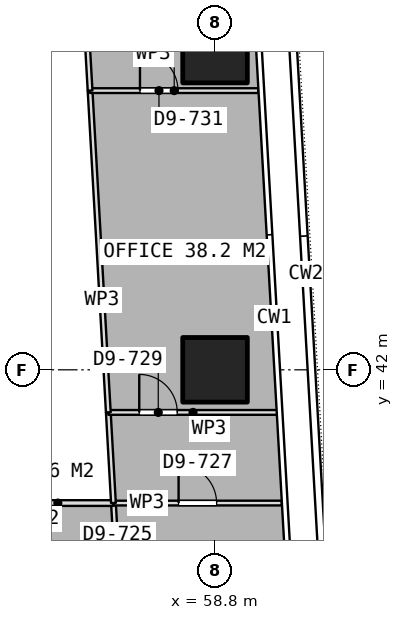
"""IFC4 building model, lengths in metres.
Left out: names, types, materials, properties, quantities, classifications, styles, units other than length and angle.
Written with IfcOpenShell. Run it as: python <this file> out.ifc"""

import sys

from ifc_helpers import new_model, si_unit, direction, frame, frame_2d, origin, origin_2d, place, context, subcontext, project, spatial, rectangle, extrude, element, fill, save


model = new_model("IFC4")
c1 = context("Model", 3, precision=1e-05, world=origin(), true_north=direction((0.0, 1.0)))
c2 = subcontext(c1, "Body", "Model", "MODEL_VIEW")
j1 = project(units=[si_unit("LENGTHUNIT", "METRE"), si_unit("PLANEANGLEUNIT", "RADIAN")], contexts=[c1])
p1 = place(None, origin())
s1 = spatial("IfcSite", under=j1, at=p1, CompositionType="ELEMENT")
p2 = place(p1, origin())
s2 = spatial("IfcBuilding", under=s1, at=p2, CompositionType="ELEMENT")
p3 = place(p2, frame((0.0, 0.0, 183.95)))
s3 = spatial("IfcBuildingStorey", under=s2, at=p3, CompositionType="ELEMENT", Elevation=183.95)
for number, where, z_axis, x_axis in (
    (1, (58.8, 42.0, 0.0), (0.0, 0.0, 1.0), (1.0, 0.0, 0.0)),
    (2, (58.8, 50.4, 0.0), (0.0, 0.0, 1.0), (1.0, 0.0, 0.0)),
):
    element("IfcColumn", number, at=place(p3, frame(where, z_axis=z_axis, x_axis=x_axis)), inside=s3, PredefinedType="COLUMN", context=c2, shape_type="SweptSolid", body=[
        extrude(rectangle(XDim=1.7, YDim=1.7, at=origin_2d()), origin(), (0.0, 0.0, 1.0), 3.75),
    ])
p4 = place(p3, frame((56.348, 34.609, 0.0), z_axis=(0.0, 0.0, 1.0), x_axis=(-0.056779989764, 0.998386715037, 0.0)))
e3 = element("IfcWall", 3, at=p4, inside=s3, PredefinedType="PARTITIONING", context=c2, shape_type="SweptSolid", body=[
    extrude(rectangle(XDim=3.891, YDim=0.125, at=frame_2d((1.946, 0.0))), origin(), (0.0, 0.0, 1.0), 3.5),
])
p5 = place(p4, frame((1.446, 0.0, 0.0)))
e4 = element("IfcOpeningElement", 4, at=p5, cuts=e3, PredefinedType="OPENING", context=c2, shape_type="SweptSolid", body=[
    extrude(rectangle(XDim=1.0, YDim=2.1, at=frame_2d((0.5, 1.05))), frame((0.0, 0.073, 0.0), z_axis=(0.0, -1.0, 0.0), x_axis=(1.0, 0.0, 0.0)), (0.0, 0.0, 1.0), 0.145),
])
p6 = place(p3, frame((56.127, 38.494, 0.0), z_axis=(0.0, 0.0, 1.0), x_axis=(1.0, 0.0, 0.0)))
e5 = element("IfcWall", 5, at=p6, inside=s3, PredefinedType="PARTITIONING", context=c2, shape_type="SweptSolid", body=[
    extrude(rectangle(XDim=4.428, YDim=0.125, at=frame_2d((2.214, 0.0))), origin(), (0.0, 0.0, 1.0), 3.5),
])
p7 = place(p6, frame((1.714, 0.0, 0.0)))
e6 = element("IfcOpeningElement", 6, at=p7, cuts=e5, PredefinedType="OPENING", context=c2, shape_type="SweptSolid", body=[
    extrude(rectangle(XDim=1.0, YDim=2.1, at=frame_2d((0.5, 1.05))), frame((0.0, 0.073, 0.0), z_axis=(0.0, -1.0, 0.0), x_axis=(1.0, 0.0, 0.0)), (0.0, 0.0, 1.0), 0.145),
])
p8 = place(p3, frame((53.2, 38.494, 0.0), z_axis=(0.0, 0.0, 1.0), x_axis=(1.0, 0.0, 0.0)))
e7 = element("IfcWall", 7, at=p8, inside=s3, PredefinedType="PARTITIONING", context=c2, shape_type="SweptSolid", body=[
    extrude(rectangle(XDim=2.927, YDim=0.15, at=frame_2d((1.463, 0.0))), origin(), (0.0, 0.0, 1.0), 3.5),
])
p9 = place(p3, frame((56.127, 38.495, 0.0), z_axis=(0.0, 0.0, 1.0), x_axis=(-0.056546005431, 0.998399994626, 0.0)))
e8 = element("IfcWall", 8, at=p9, inside=s3, PredefinedType="PARTITIONING", context=c2, shape_type="SweptSolid", body=[
    extrude(rectangle(XDim=2.388, YDim=0.125, at=frame_2d((1.194, 0.0))), origin(), (0.0, 0.0, 1.0), 3.5),
])
p10 = place(p3, frame((55.992, 40.879, 0.0), z_axis=(0.0, 0.0, 1.0), x_axis=(1.0, 0.0, 0.0)))
e9 = element("IfcWall", 9, at=p10, inside=s3, PredefinedType="PARTITIONING", context=c2, shape_type="SweptSolid", body=[
    extrude(rectangle(XDim=4.457, YDim=0.125, at=frame_2d((2.229, 0.0))), origin(), (0.0, 0.0, 1.0), 3.5),
])
p11 = place(p10, frame((0.814, 0.0, 0.0)))
e10 = element("IfcOpeningElement", 10, at=p11, cuts=e9, PredefinedType="OPENING", context=c2, shape_type="SweptSolid", body=[
    extrude(rectangle(XDim=1.0, YDim=2.1, at=frame_2d((0.5, 1.05))), frame((0.0, 0.073, 0.0), z_axis=(0.0, -1.0, 0.0), x_axis=(1.0, 0.0, 0.0)), (0.0, 0.0, 1.0), 0.145),
])
p12 = place(p3, frame((55.992, 40.88, 0.0), z_axis=(0.0, 0.0, 1.0), x_axis=(-0.056603741884, 0.998396722954, 0.0)))
e11 = element("IfcWall", 11, at=p12, inside=s3, PredefinedType="PARTITIONING", context=c2, shape_type="SweptSolid", body=[
    extrude(rectangle(XDim=8.48, YDim=0.125, at=frame_2d((4.24, 0.0))), origin(), (0.0, 0.0, 1.0), 3.5),
])
p13 = place(p3, frame((55.512, 49.346, 0.0), z_axis=(0.0, 0.0, 1.0), x_axis=(1.0, 0.0, 0.0)))
e12 = element("IfcWall", 12, at=p13, inside=s3, PredefinedType="PARTITIONING", context=c2, shape_type="SweptSolid", body=[
    extrude(rectangle(XDim=4.427, YDim=0.125, at=frame_2d((2.213, 0.0))), origin(), (0.0, 0.0, 1.0), 3.5),
])
p14 = place(p13, frame((1.313, 0.0, 0.0)))
e13 = element("IfcOpeningElement", 13, at=p14, cuts=e12, PredefinedType="OPENING", context=c2, shape_type="SweptSolid", body=[
    extrude(rectangle(XDim=1.0, YDim=2.1, at=frame_2d((0.5, 1.05))), frame((0.0, 0.073, 0.0), z_axis=(0.0, -1.0, 0.0), x_axis=(1.0, 0.0, 0.0)), (0.0, 0.0, 1.0), 0.145),
])
p15 = place(p3, frame((55.512, 49.347, 0.0), z_axis=(0.0, 0.0, 1.0), x_axis=(-0.056790198377, 0.998386134403, 0.0)))
e14 = element("IfcWall", 14, at=p15, inside=s3, PredefinedType="PARTITIONING", context=c2, shape_type="SweptSolid", body=[
    extrude(rectangle(XDim=7.098, YDim=0.125, at=frame_2d((3.549, 0.0))), origin(), (0.0, 0.0, 1.0), 3.5),
])
p16 = place(p7, origin())
e15 = element("IfcDoor", 15, at=p16, inside=s3, OperationType="SINGLE_SWING_LEFT", PredefinedType="DOOR", context=c2, shape_type="SweptSolid", body=[
    extrude(rectangle(XDim=1.0, YDim=2.1, at=frame_2d((0.5, 1.05))), frame((0.0, 0.025, 0.0), z_axis=(0.0, -1.0, 0.0), x_axis=(1.0, 0.0, 0.0)), (0.0, 0.0, 1.0), 0.05),
])
fill(e6, e15)
p17 = place(p11, origin())
e16 = element("IfcDoor", 16, at=p17, inside=s3, OperationType="SINGLE_SWING_LEFT", PredefinedType="DOOR", context=c2, shape_type="SweptSolid", body=[
    extrude(rectangle(XDim=1.0, YDim=2.1, at=frame_2d((0.5, 1.05))), frame((0.0, 0.025, 0.0), z_axis=(0.0, -1.0, 0.0), x_axis=(1.0, 0.0, 0.0)), (0.0, 0.0, 1.0), 0.05),
])
fill(e10, e16)
p18 = place(p14, origin())
e17 = element("IfcDoor", 17, at=p18, inside=s3, OperationType="SINGLE_SWING_LEFT", PredefinedType="DOOR", context=c2, shape_type="SweptSolid", body=[
    extrude(rectangle(XDim=1.0, YDim=2.1, at=frame_2d((0.5, 1.05))), frame((0.0, 0.025, 0.0), z_axis=(0.0, -1.0, 0.0), x_axis=(1.0, 0.0, 0.0)), (0.0, 0.0, 1.0), 0.05),
])
fill(e13, e17)
save(model, sys.argv[1])
